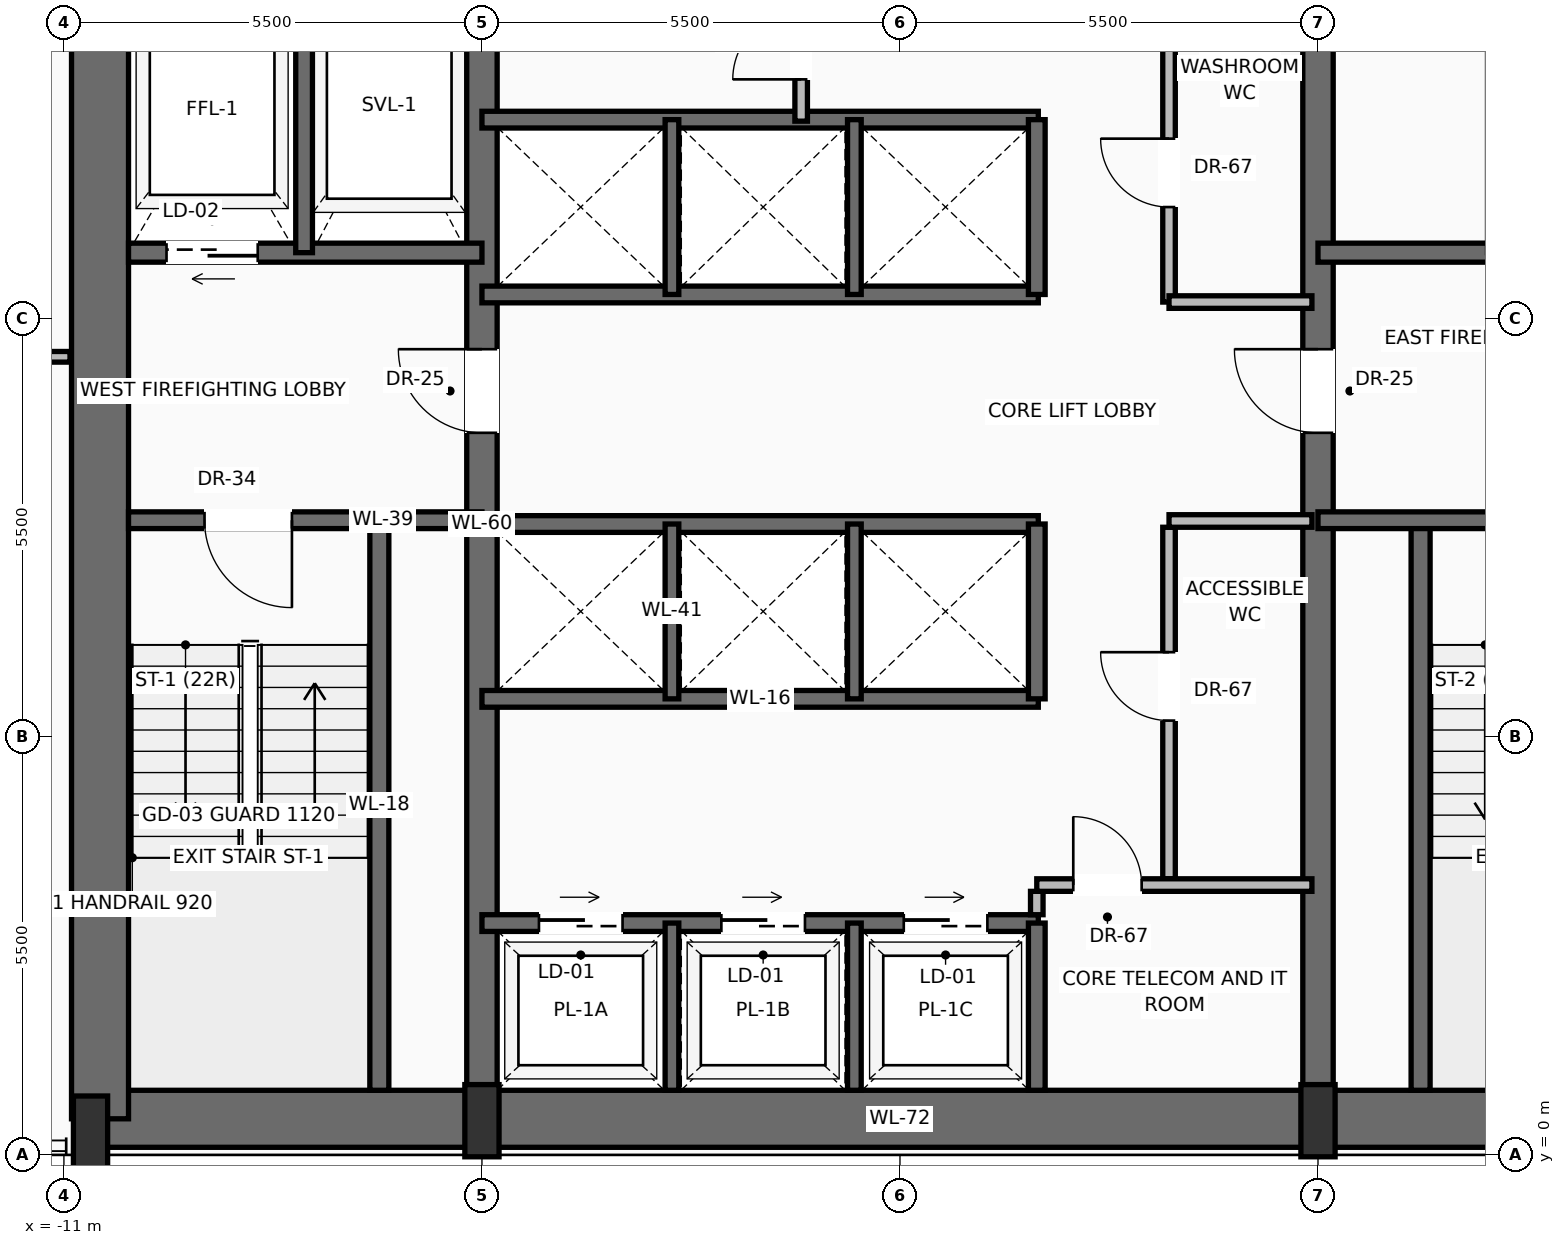
"""IFC4 building model, lengths in metres.
Left out: names, types, materials, properties, quantities, classifications, styles, units other than length and angle.
Written with IfcOpenShell. Run it as: python <this file> out.ifc"""

import sys

from ifc_helpers import new_model, si_unit, direction, frame, frame_2d, origin, origin_2d, place, context, subcontext, project, spatial, rectangle, extrude, source, transform, mapped, element, fill, save


model = new_model("IFC4")
c1 = context("Model", 3, precision=1e-05, world=origin(), true_north=direction((0.0, 1.0)))
c2 = subcontext(c1, "Body", "Model", "MODEL_VIEW")
j1 = project(units=[si_unit("LENGTHUNIT", "METRE"), si_unit("PLANEANGLEUNIT", "RADIAN")], contexts=[c1])
p1 = place(None, origin())
s1 = spatial("IfcSite", under=j1, at=p1, CompositionType="ELEMENT")
p2 = place(p1, origin())
s2 = spatial("IfcBuilding", under=s1, at=p2, CompositionType="ELEMENT")
p3 = place(p2, frame((0.0, 0.0, 91.4)))
s3 = spatial("IfcBuildingStorey", under=s2, at=p3, CompositionType="ELEMENT", Elevation=91.4)
p4 = place(p3, frame((-10.65, 0.475, 0.0), z_axis=(0.0, 0.0, 1.0), x_axis=(1.0, 0.0, 0.0)))
e1 = element("IfcWall", 1, at=p4, inside=s3, PredefinedType="SHEAR", context=c2, shape_type="SweptSolid", body=[
    extrude(rectangle(XDim=21.3, YDim=0.75, at=frame_2d((10.65, 0.0))), origin(), (0.0, 0.0, 1.0), 3.45),
])
p5 = place(p3, frame((-10.525, 0.475, 0.0), z_axis=(0.0, 0.0, 1.0), x_axis=(0.0, 1.0, 0.0)))
e2 = element("IfcWall", 2, at=p5, inside=s3, PredefinedType="SHEAR", context=c2, shape_type="SweptSolid", body=[
    extrude(rectangle(XDim=15.65, YDim=0.75, at=frame_2d((7.825, 0.0))), origin(), (0.0, 0.0, 1.0), 3.45),
])
p6 = place(p3, frame((-5.5, 0.475, 0.0), z_axis=(0.0, 0.0, 1.0), x_axis=(0.0, 1.0, 0.0)))
e3 = element("IfcWall", 3, at=p6, inside=s3, PredefinedType="SHEAR", context=c2, shape_type="SweptSolid", body=[
    extrude(rectangle(XDim=15.65, YDim=0.4, at=frame_2d((7.825, 0.0))), origin(), (0.0, 0.0, 1.0), 3.45),
])
p7 = place(p6, frame((9.025, 0.0, 0.0)))
e4 = element("IfcOpeningElement", 4, at=p7, cuts=e3, PredefinedType="OPENING", context=c2, shape_type="SweptSolid", body=[
    extrude(rectangle(XDim=1.1, YDim=2.2, at=frame_2d((0.55, 1.1))), frame((0.0, 0.21, 0.0), z_axis=(0.0, -1.0, 0.0), x_axis=(1.0, 0.0, 0.0)), (0.0, 0.0, 1.0), 0.42),
])
p8 = place(p3, frame((5.5, 0.475, 0.0), z_axis=(0.0, 0.0, 1.0), x_axis=(0.0, 1.0, 0.0)))
e5 = element("IfcWall", 5, at=p8, inside=s3, PredefinedType="SHEAR", context=c2, shape_type="SweptSolid", body=[
    extrude(rectangle(XDim=15.65, YDim=0.4, at=frame_2d((7.825, 0.0))), origin(), (0.0, 0.0, 1.0), 3.45),
])
p9 = place(p8, frame((9.025, 0.0, 0.0)))
e6 = element("IfcOpeningElement", 6, at=p9, cuts=e5, PredefinedType="OPENING", context=c2, shape_type="SweptSolid", body=[
    extrude(rectangle(XDim=1.1, YDim=2.2, at=frame_2d((0.55, 1.1))), frame((0.0, 0.21, 0.0), z_axis=(0.0, -1.0, 0.0), x_axis=(1.0, 0.0, 0.0)), (0.0, 0.0, 1.0), 0.42),
])
m1 = source(origin(), c2, "Body", "SweptSolid", [
    extrude(rectangle(XDim=0.45, YDim=0.95, at=origin_2d()), origin(), (0.0, 0.0, 1.0), 3.7),
])
for number, where, z_axis, x_axis in (
    (7, (-10.65, 0.3, 0.0), (0.0, 0.0, 1.0), (1.0, 0.0, 0.0)),
    (8, (-5.5, 0.45, 0.0), (0.0, 0.0, 1.0), (1.0, 0.0, 0.0)),
    (9, (5.5, 0.45, 0.0), (0.0, 0.0, 1.0), (1.0, 0.0, 0.0)),
):
    element("IfcColumn", number, at=place(p3, frame(where, z_axis=z_axis, x_axis=x_axis)), inside=s3, PredefinedType="PILASTER", context=c2, shape_type="MappedRepresentation", body=[
        mapped(m1, transform((0.0, 0.0, 0.0), scale=1.0)),
    ])
p10 = place(p3, frame((-6.85, 0.85, 0.0), z_axis=(0.0, 0.0, 1.0), x_axis=(0.0, 1.0, 0.0)))
e10 = element("IfcWall", 10, at=p10, inside=s3, PredefinedType="SOLIDWALL", context=c2, shape_type="SweptSolid", body=[
    extrude(rectangle(XDim=7.5, YDim=0.25, at=frame_2d((3.75, 0.0))), origin(), (0.0, 0.0, 1.0), 3.45),
])
p11 = place(p3, frame((-5.5, 8.35, 0.0), z_axis=(0.0, 0.0, 1.0), x_axis=(-1.0, 0.0, 0.0)))
e11 = element("IfcWall", 11, at=p11, inside=s3, PredefinedType="SOLIDWALL", context=c2, shape_type="SweptSolid", body=[
    extrude(rectangle(XDim=4.65, YDim=0.22, at=frame_2d((2.325, 0.0))), origin(), (0.0, 0.0, 1.0), 3.45),
])
p12 = place(p11, frame((2.5, 0.0, 0.0)))
e12 = element("IfcOpeningElement", 12, at=p12, cuts=e11, PredefinedType="OPENING", context=c2, shape_type="SweptSolid", body=[
    extrude(rectangle(XDim=1.15, YDim=2.2, at=frame_2d((0.575, 1.1))), frame((0.0, 0.12, 0.0), z_axis=(0.0, -1.0, 0.0), x_axis=(1.0, 0.0, 0.0)), (0.0, 0.0, 1.0), 0.24),
])
p13 = place(p3, frame((-5.5, 11.87, 0.0), z_axis=(0.0, 0.0, 1.0), x_axis=(-1.0, 0.0, 0.0)))
e13 = element("IfcWall", 13, at=p13, inside=s3, PredefinedType="SOLIDWALL", context=c2, shape_type="SweptSolid", body=[
    extrude(rectangle(XDim=4.65, YDim=0.25, at=frame_2d((2.325, 0.0))), origin(), (0.0, 0.0, 1.0), 3.45),
])
p14 = place(p13, frame((2.95, 0.0, 0.0)))
e14 = element("IfcOpeningElement", 14, at=p14, cuts=e13, PredefinedType="OPENING", context=c2, shape_type="SweptSolid", body=[
    extrude(rectangle(XDim=1.2, YDim=2.25, at=frame_2d((0.6, 1.125))), frame((0.0, 0.135, 0.0), z_axis=(0.0, -1.0, 0.0), x_axis=(1.0, 0.0, 0.0)), (0.0, 0.0, 1.0), 0.27),
])
p15 = place(p3, frame((-7.84, 11.87, 0.0), z_axis=(0.0, 0.0, 1.0), x_axis=(0.0, 1.0, 0.0)))
e15 = element("IfcWall", 15, at=p15, inside=s3, PredefinedType="SOLIDWALL", context=c2, shape_type="SweptSolid", body=[
    extrude(rectangle(XDim=3.88, YDim=0.22, at=frame_2d((1.94, 0.0))), origin(), (0.0, 0.0, 1.0), 3.45),
])
p16 = place(p3, frame((6.85, 0.85, 0.0), z_axis=(0.0, 0.0, 1.0), x_axis=(0.0, 1.0, 0.0)))
e16 = element("IfcWall", 16, at=p16, inside=s3, PredefinedType="SOLIDWALL", context=c2, shape_type="SweptSolid", body=[
    extrude(rectangle(XDim=7.5, YDim=0.25, at=frame_2d((3.75, 0.0))), origin(), (0.0, 0.0, 1.0), 3.45),
])
p17 = place(p3, frame((10.15, 8.35, 0.0), z_axis=(0.0, 0.0, 1.0), x_axis=(-1.0, 0.0, 0.0)))
e17 = element("IfcWall", 17, at=p17, inside=s3, PredefinedType="SOLIDWALL", context=c2, shape_type="SweptSolid", body=[
    extrude(rectangle(XDim=4.65, YDim=0.22, at=frame_2d((2.325, 0.0))), origin(), (0.0, 0.0, 1.0), 3.45),
])
p18 = place(p17, frame((1.0, 0.0, 0.0)))
e18 = element("IfcOpeningElement", 18, at=p18, cuts=e17, PredefinedType="OPENING", context=c2, shape_type="SweptSolid", body=[
    extrude(rectangle(XDim=1.15, YDim=2.2, at=frame_2d((0.575, 1.1))), frame((0.0, 0.12, 0.0), z_axis=(0.0, -1.0, 0.0), x_axis=(1.0, 0.0, 0.0)), (0.0, 0.0, 1.0), 0.24),
])
p19 = place(p3, frame((10.15, 11.87, 0.0), z_axis=(0.0, 0.0, 1.0), x_axis=(-1.0, 0.0, 0.0)))
e19 = element("IfcWall", 19, at=p19, inside=s3, PredefinedType="SOLIDWALL", context=c2, shape_type="SweptSolid", body=[
    extrude(rectangle(XDim=4.65, YDim=0.25, at=frame_2d((2.325, 0.0))), origin(), (0.0, 0.0, 1.0), 3.45),
])
p20 = place(p19, frame((0.5, 0.0, 0.0)))
e20 = element("IfcOpeningElement", 20, at=p20, cuts=e19, PredefinedType="OPENING", context=c2, shape_type="SweptSolid", body=[
    extrude(rectangle(XDim=1.2, YDim=2.25, at=frame_2d((0.6, 1.125))), frame((0.0, 0.135, 0.0), z_axis=(0.0, -1.0, 0.0), x_axis=(1.0, 0.0, 0.0)), (0.0, 0.0, 1.0), 0.27),
])
p21 = place(p3, frame((-5.5, 3.05, 0.0), z_axis=(0.0, 0.0, 1.0), x_axis=(1.0, 0.0, 0.0)))
e21 = element("IfcWall", 21, at=p21, inside=s3, PredefinedType="SOLIDWALL", context=c2, shape_type="SweptSolid", body=[
    extrude(rectangle(XDim=7.32, YDim=0.22, at=frame_2d((3.66, 0.0))), origin(), (0.0, 0.0, 1.0), 3.45),
])
p22 = place(p21, frame((0.75, 0.0, 0.0)))
e22 = element("IfcOpeningElement", 22, at=p22, cuts=e21, PredefinedType="OPENING", context=c2, shape_type="SweptSolid", body=[
    extrude(rectangle(XDim=1.1, YDim=2.2, at=frame_2d((0.55, 1.1))), frame((0.0, 0.12, 0.0), z_axis=(0.0, -1.0, 0.0), x_axis=(1.0, 0.0, 0.0)), (0.0, 0.0, 1.0), 0.24),
])
p23 = place(p21, frame((3.15, 0.0, 0.0)))
e23 = element("IfcOpeningElement", 23, at=p23, cuts=e21, PredefinedType="OPENING", context=c2, shape_type="SweptSolid", body=[
    extrude(rectangle(XDim=1.1, YDim=2.2, at=frame_2d((0.55, 1.1))), frame((0.0, 0.12, 0.0), z_axis=(0.0, -1.0, 0.0), x_axis=(1.0, 0.0, 0.0)), (0.0, 0.0, 1.0), 0.24),
])
p24 = place(p21, frame((5.55, 0.0, 0.0)))
e24 = element("IfcOpeningElement", 24, at=p24, cuts=e21, PredefinedType="OPENING", context=c2, shape_type="SweptSolid", body=[
    extrude(rectangle(XDim=1.1, YDim=2.2, at=frame_2d((0.55, 1.1))), frame((0.0, 0.12, 0.0), z_axis=(0.0, -1.0, 0.0), x_axis=(1.0, 0.0, 0.0)), (0.0, 0.0, 1.0), 0.24),
])
p25 = place(p3, frame((1.8, 0.85, 0.0), z_axis=(0.0, 0.0, 1.0), x_axis=(0.0, 1.0, 0.0)))
e25 = element("IfcWall", 25, at=p25, inside=s3, PredefinedType="SOLIDWALL", context=c2, shape_type="SweptSolid", body=[
    extrude(rectangle(XDim=2.2, YDim=0.22, at=frame_2d((1.1, 0.0))), origin(), (0.0, 0.0, 1.0), 3.45),
])
for number, where, z_axis, x_axis in (
    (26, (-3.0, 0.85, 0.0), (0.0, 0.0, 1.0), (0.0, 1.0, 0.0)),
    (27, (-0.6, 0.85, 0.0), (0.0, 0.0, 1.0), (0.0, 1.0, 0.0)),
):
    element("IfcWall", number, at=place(p3, frame(where, z_axis=z_axis, x_axis=x_axis)), inside=s3, PredefinedType="SOLIDWALL", context=c2, shape_type="SweptSolid", body=[
        extrude(rectangle(XDim=2.2, YDim=0.18, at=frame_2d((1.1, 0.0))), origin(), (0.0, 0.0, 1.0), 3.45),
    ])
p26 = place(p3, frame((1.8, 3.16, 0.0), z_axis=(0.0, 0.0, 1.0), x_axis=(0.0, 1.0, 0.0)))
e28 = element("IfcWall", 28, at=p26, inside=s3, PredefinedType="PARTITIONING", context=c2, shape_type="SweptSolid", body=[
    extrude(rectangle(XDim=0.308, YDim=0.165, at=frame_2d((0.154, 0.0))), origin(), (0.0, 0.0, 1.0), 3.442),
])
p27 = place(p3, frame((3.54, 3.633, 0.0), z_axis=(0.0, 0.0, 1.0), x_axis=(0.0, 1.0, 0.0)))
e29 = element("IfcWall", 29, at=p27, inside=s3, PredefinedType="PARTITIONING", context=c2, shape_type="SweptSolid", body=[
    extrude(rectangle(XDim=4.625, YDim=0.165, at=frame_2d((2.312, 0.0))), origin(), (0.0, 0.0, 1.0), 3.442),
])
p28 = place(p27, frame((2.081, 0.0, 0.0)))
e30 = element("IfcOpeningElement", 30, at=p28, cuts=e29, PredefinedType="OPENING", context=c2, shape_type="SweptSolid", body=[
    extrude(rectangle(XDim=0.9, YDim=2.1, at=frame_2d((0.45, 1.05))), frame((0.0, 0.093, 0.0), z_axis=(0.0, -1.0, 0.0), x_axis=(1.0, 0.0, 0.0)), (0.0, 0.0, 1.0), 0.185),
])
p29 = place(p3, frame((3.54, 8.34, 0.0), z_axis=(0.0, 0.0, 1.0), x_axis=(1.0, 0.0, 0.0)))
e31 = element("IfcWall", 31, at=p29, inside=s3, PredefinedType="PARTITIONING", context=c2, shape_type="SweptSolid", body=[
    extrude(rectangle(XDim=1.88, YDim=0.165, at=frame_2d((0.94, 0.0))), origin(), (0.0, 0.0, 1.0), 3.442),
])
p30 = place(p3, frame((1.8, 3.55, 0.0), z_axis=(0.0, 0.0, 1.0), x_axis=(1.0, 0.0, 0.0)))
e32 = element("IfcWall", 32, at=p30, inside=s3, PredefinedType="PARTITIONING", context=c2, shape_type="SweptSolid", body=[
    extrude(rectangle(XDim=3.62, YDim=0.165, at=frame_2d((1.81, 0.0))), origin(), (0.0, 0.0, 1.0), 3.442),
])
p31 = place(p30, frame((0.48, 0.0, 0.0)))
e33 = element("IfcOpeningElement", 33, at=p31, cuts=e32, PredefinedType="OPENING", context=c2, shape_type="SweptSolid", body=[
    extrude(rectangle(XDim=0.9, YDim=2.1, at=frame_2d((0.45, 1.05))), frame((0.0, 0.093, 0.0), z_axis=(0.0, -1.0, 0.0), x_axis=(1.0, 0.0, 0.0)), (0.0, 0.0, 1.0), 0.185),
])
for number, where, z_axis, x_axis in (
    (34, (-5.5, 6.0, 0.0), (0.0, 0.0, 1.0), (1.0, 0.0, 0.0)),
    (35, (-5.5, 8.3, 0.0), (0.0, 0.0, 1.0), (1.0, 0.0, 0.0)),
):
    element("IfcWall", number, at=place(p3, frame(where, z_axis=z_axis, x_axis=x_axis)), inside=s3, PredefinedType="SOLIDWALL", context=c2, shape_type="SweptSolid", body=[
        extrude(rectangle(XDim=7.32, YDim=0.22, at=frame_2d((3.66, 0.0))), origin(), (0.0, 0.0, 1.0), 3.45),
    ])
p32 = place(p3, frame((1.8, 6.0, 0.0), z_axis=(0.0, 0.0, 1.0), x_axis=(0.0, 1.0, 0.0)))
e36 = element("IfcWall", 36, at=p32, inside=s3, PredefinedType="SOLIDWALL", context=c2, shape_type="SweptSolid", body=[
    extrude(rectangle(XDim=2.3, YDim=0.22, at=frame_2d((1.15, 0.0))), origin(), (0.0, 0.0, 1.0), 3.45),
])
for number, where, z_axis, x_axis in (
    (37, (-3.0, 6.0, 0.0), (0.0, 0.0, 1.0), (0.0, 1.0, 0.0)),
    (38, (-0.6, 6.0, 0.0), (0.0, 0.0, 1.0), (0.0, 1.0, 0.0)),
):
    element("IfcWall", number, at=place(p3, frame(where, z_axis=z_axis, x_axis=x_axis)), inside=s3, PredefinedType="SOLIDWALL", context=c2, shape_type="SweptSolid", body=[
        extrude(rectangle(XDim=2.3, YDim=0.18, at=frame_2d((1.15, 0.0))), origin(), (0.0, 0.0, 1.0), 3.45),
    ])
for number, where, z_axis, x_axis in (
    (39, (-5.5, 11.32, 0.0), (0.0, 0.0, 1.0), (1.0, 0.0, 0.0)),
    (40, (-5.5, 13.62, 0.0), (0.0, 0.0, 1.0), (1.0, 0.0, 0.0)),
):
    element("IfcWall", number, at=place(p3, frame(where, z_axis=z_axis, x_axis=x_axis)), inside=s3, PredefinedType="SOLIDWALL", context=c2, shape_type="SweptSolid", body=[
        extrude(rectangle(XDim=7.32, YDim=0.22, at=frame_2d((3.66, 0.0))), origin(), (0.0, 0.0, 1.0), 3.45),
    ])
p33 = place(p3, frame((1.8, 11.32, 0.0), z_axis=(0.0, 0.0, 1.0), x_axis=(0.0, 1.0, 0.0)))
e41 = element("IfcWall", 41, at=p33, inside=s3, PredefinedType="SOLIDWALL", context=c2, shape_type="SweptSolid", body=[
    extrude(rectangle(XDim=2.3, YDim=0.22, at=frame_2d((1.15, 0.0))), origin(), (0.0, 0.0, 1.0), 3.45),
])
for number, where, z_axis, x_axis in (
    (42, (-3.0, 11.32, 0.0), (0.0, 0.0, 1.0), (0.0, 1.0, 0.0)),
    (43, (-0.6, 11.32, 0.0), (0.0, 0.0, 1.0), (0.0, 1.0, 0.0)),
):
    element("IfcWall", number, at=place(p3, frame(where, z_axis=z_axis, x_axis=x_axis)), inside=s3, PredefinedType="SOLIDWALL", context=c2, shape_type="SweptSolid", body=[
        extrude(rectangle(XDim=2.3, YDim=0.18, at=frame_2d((1.15, 0.0))), origin(), (0.0, 0.0, 1.0), 3.45),
    ])
p34 = place(p3, frame((-1.3, 13.6, 0.0), z_axis=(0.0, 0.0, 1.0), x_axis=(0.0, 1.0, 0.0)))
e44 = element("IfcWall", 44, at=p34, inside=s3, PredefinedType="PARTITIONING", context=c2, shape_type="SweptSolid", body=[
    extrude(rectangle(XDim=2.15, YDim=0.165, at=frame_2d((1.075, 0.0))), origin(), (0.0, 0.0, 1.0), 3.442),
])
p35 = place(p34, frame((0.55, 0.0, 0.0)))
e45 = element("IfcOpeningElement", 45, at=p35, cuts=e44, PredefinedType="OPENING", context=c2, shape_type="SweptSolid", body=[
    extrude(rectangle(XDim=0.9, YDim=2.1, at=frame_2d((0.45, 1.05))), frame((0.0, 0.093, 0.0), z_axis=(0.0, -1.0, 0.0), x_axis=(1.0, 0.0, 0.0)), (0.0, 0.0, 1.0), 0.185),
])
p36 = place(p3, frame((3.54, 11.22, 0.0), z_axis=(0.0, 0.0, 1.0), x_axis=(0.0, 1.0, 0.0)))
e46 = element("IfcWall", 46, at=p36, inside=s3, PredefinedType="PARTITIONING", context=c2, shape_type="SweptSolid", body=[
    extrude(rectangle(XDim=4.53, YDim=0.165, at=frame_2d((2.265, 0.0))), origin(), (0.0, 0.0, 1.0), 3.442),
])
p37 = place(p36, frame((1.25, 0.0, 0.0)))
e47 = element("IfcOpeningElement", 47, at=p37, cuts=e46, PredefinedType="OPENING", context=c2, shape_type="SweptSolid", body=[
    extrude(rectangle(XDim=0.9, YDim=2.1, at=frame_2d((0.45, 1.05))), frame((0.0, 0.093, 0.0), z_axis=(0.0, -1.0, 0.0), x_axis=(1.0, 0.0, 0.0)), (0.0, 0.0, 1.0), 0.185),
])
p38 = place(p3, frame((3.54, 11.22, 0.0), z_axis=(0.0, 0.0, 1.0), x_axis=(1.0, 0.0, 0.0)))
e48 = element("IfcWall", 48, at=p38, inside=s3, PredefinedType="PARTITIONING", context=c2, shape_type="SweptSolid", body=[
    extrude(rectangle(XDim=1.88, YDim=0.165, at=frame_2d((0.94, 0.0))), origin(), (0.0, 0.0, 1.0), 3.442),
])
p39 = place(p3, frame((-27.051, 10.5, 0.0), z_axis=(0.0, 0.0, 1.0), x_axis=(1.0, 0.0, 0.0)))
e49 = element("IfcWall", 49, at=p39, inside=s3, PredefinedType="PARTITIONING", context=c2, shape_type="SweptSolid", body=[
    extrude(rectangle(XDim=16.131, YDim=0.14, at=frame_2d((8.066, 0.0))), origin(), (0.0, 0.0, 1.0), 3.442),
])
p40 = place(p39, frame((7.603, 0.0, 0.0)))
e50 = element("IfcOpeningElement", 50, at=p40, cuts=e49, PredefinedType="OPENING", context=c2, shape_type="SweptSolid", body=[
    extrude(rectangle(XDim=0.95, YDim=2.2, at=frame_2d((0.475, 1.1))), frame((0.0, 0.08, 0.0), z_axis=(0.0, -1.0, 0.0), x_axis=(1.0, 0.0, 0.0)), (0.0, 0.0, 1.0), 0.16),
])
m2 = source(origin(), c2, "Body", "SweptSolid", [
    extrude(rectangle(XDim=1.15, YDim=2.2, at=frame_2d((0.575, 1.1))), frame((0.0, 0.025, 0.0), z_axis=(0.0, -1.0, 0.0), x_axis=(1.0, 0.0, 0.0)), (0.0, 0.0, 1.0), 0.05),
])
p41 = place(p12, origin())
e51 = element("IfcDoor", 51, at=p41, inside=s3, OperationType="SINGLE_SWING_LEFT", PredefinedType="DOOR", context=c2, shape_type="MappedRepresentation", body=[
    mapped(m2, transform((0.0, 0.0, 0.0), scale=1.0)),
])
fill(e12, e51)
m3 = source(origin(), c2, "Body", "SweptSolid", [
    extrude(rectangle(XDim=1.1, YDim=2.2, at=frame_2d((0.55, 1.1))), frame((0.0, 0.025, 0.0), z_axis=(0.0, -1.0, 0.0), x_axis=(1.0, 0.0, 0.0)), (0.0, 0.0, 1.0), 0.05),
])
p42 = place(p7, origin())
e52 = element("IfcDoor", 52, at=p42, inside=s3, OperationType="SINGLE_SWING_RIGHT", PredefinedType="DOOR", context=c2, shape_type="MappedRepresentation", body=[
    mapped(m3, transform((0.0, 0.0, 0.0), scale=1.0)),
])
fill(e4, e52)
m4 = source(origin(), c2, "Body", "SweptSolid", [
    extrude(rectangle(XDim=1.2, YDim=2.25, at=frame_2d((0.6, 1.125))), frame((0.0, 0.025, 0.0), z_axis=(0.0, -1.0, 0.0), x_axis=(1.0, 0.0, 0.0)), (0.0, 0.0, 1.0), 0.05),
])
p43 = place(p14, origin())
e53 = element("IfcDoor", 53, at=p43, inside=s3, OperationType="SLIDING_TO_LEFT", PredefinedType="DOOR", context=c2, shape_type="MappedRepresentation", body=[
    mapped(m4, transform((0.0, 0.0, 0.0), scale=1.0)),
])
fill(e14, e53)
p44 = place(p9, origin())
e54 = element("IfcDoor", 54, at=p44, inside=s3, OperationType="SINGLE_SWING_RIGHT", PredefinedType="DOOR", context=c2, shape_type="MappedRepresentation", body=[
    mapped(m3, transform((0.0, 0.0, 0.0), scale=1.0)),
])
fill(e6, e54)
m5 = source(origin(), c2, "Body", "SweptSolid", [
    extrude(rectangle(XDim=1.1, YDim=2.2, at=frame_2d((0.55, 1.1))), frame((0.0, 0.025, 0.0), z_axis=(0.0, -1.0, 0.0), x_axis=(1.0, 0.0, 0.0)), (0.0, 0.0, 1.0), 0.05),
])
p45 = place(p22, origin())
e55 = element("IfcDoor", 55, at=p45, inside=s3, OperationType="SLIDING_TO_RIGHT", PredefinedType="DOOR", context=c2, shape_type="MappedRepresentation", body=[
    mapped(m5, transform((0.0, 0.0, 0.0), scale=1.0)),
])
fill(e22, e55)
p46 = place(p23, origin())
e56 = element("IfcDoor", 56, at=p46, inside=s3, OperationType="SLIDING_TO_RIGHT", PredefinedType="DOOR", context=c2, shape_type="MappedRepresentation", body=[
    mapped(m5, transform((0.0, 0.0, 0.0), scale=1.0)),
])
fill(e23, e56)
p47 = place(p24, origin())
e57 = element("IfcDoor", 57, at=p47, inside=s3, OperationType="SLIDING_TO_RIGHT", PredefinedType="DOOR", context=c2, shape_type="MappedRepresentation", body=[
    mapped(m5, transform((0.0, 0.0, 0.0), scale=1.0)),
])
fill(e24, e57)
m6 = source(origin(), c2, "Body", "SweptSolid", [
    extrude(rectangle(XDim=0.9, YDim=2.1, at=frame_2d((0.45, 1.05))), frame((0.0, 0.025, 0.0), z_axis=(0.0, -1.0, 0.0), x_axis=(1.0, 0.0, 0.0)), (0.0, 0.0, 1.0), 0.05),
])
p48 = place(p31, origin())
e58 = element("IfcDoor", 58, at=p48, inside=s3, OperationType="SINGLE_SWING_LEFT", PredefinedType="DOOR", context=c2, shape_type="MappedRepresentation", body=[
    mapped(m6, transform((0.0, 0.0, 0.0), scale=1.0)),
])
fill(e33, e58)
p49 = place(p28, origin())
e59 = element("IfcDoor", 59, at=p49, inside=s3, OperationType="SINGLE_SWING_RIGHT", PredefinedType="DOOR", context=c2, shape_type="MappedRepresentation", body=[
    mapped(m6, transform((0.0, 0.0, 0.0), scale=1.0)),
])
fill(e30, e59)
p50 = place(p35, origin())
e60 = element("IfcDoor", 60, at=p50, inside=s3, OperationType="SINGLE_SWING_LEFT", PredefinedType="DOOR", context=c2, shape_type="MappedRepresentation", body=[
    mapped(m6, transform((0.0, 0.0, 0.0), scale=1.0)),
])
fill(e45, e60)
p51 = place(p37, origin())
e61 = element("IfcDoor", 61, at=p51, inside=s3, OperationType="SINGLE_SWING_RIGHT", PredefinedType="DOOR", context=c2, shape_type="MappedRepresentation", body=[
    mapped(m6, transform((0.0, 0.0, 0.0), scale=1.0)),
])
fill(e47, e61)
save(model, sys.argv[1])
